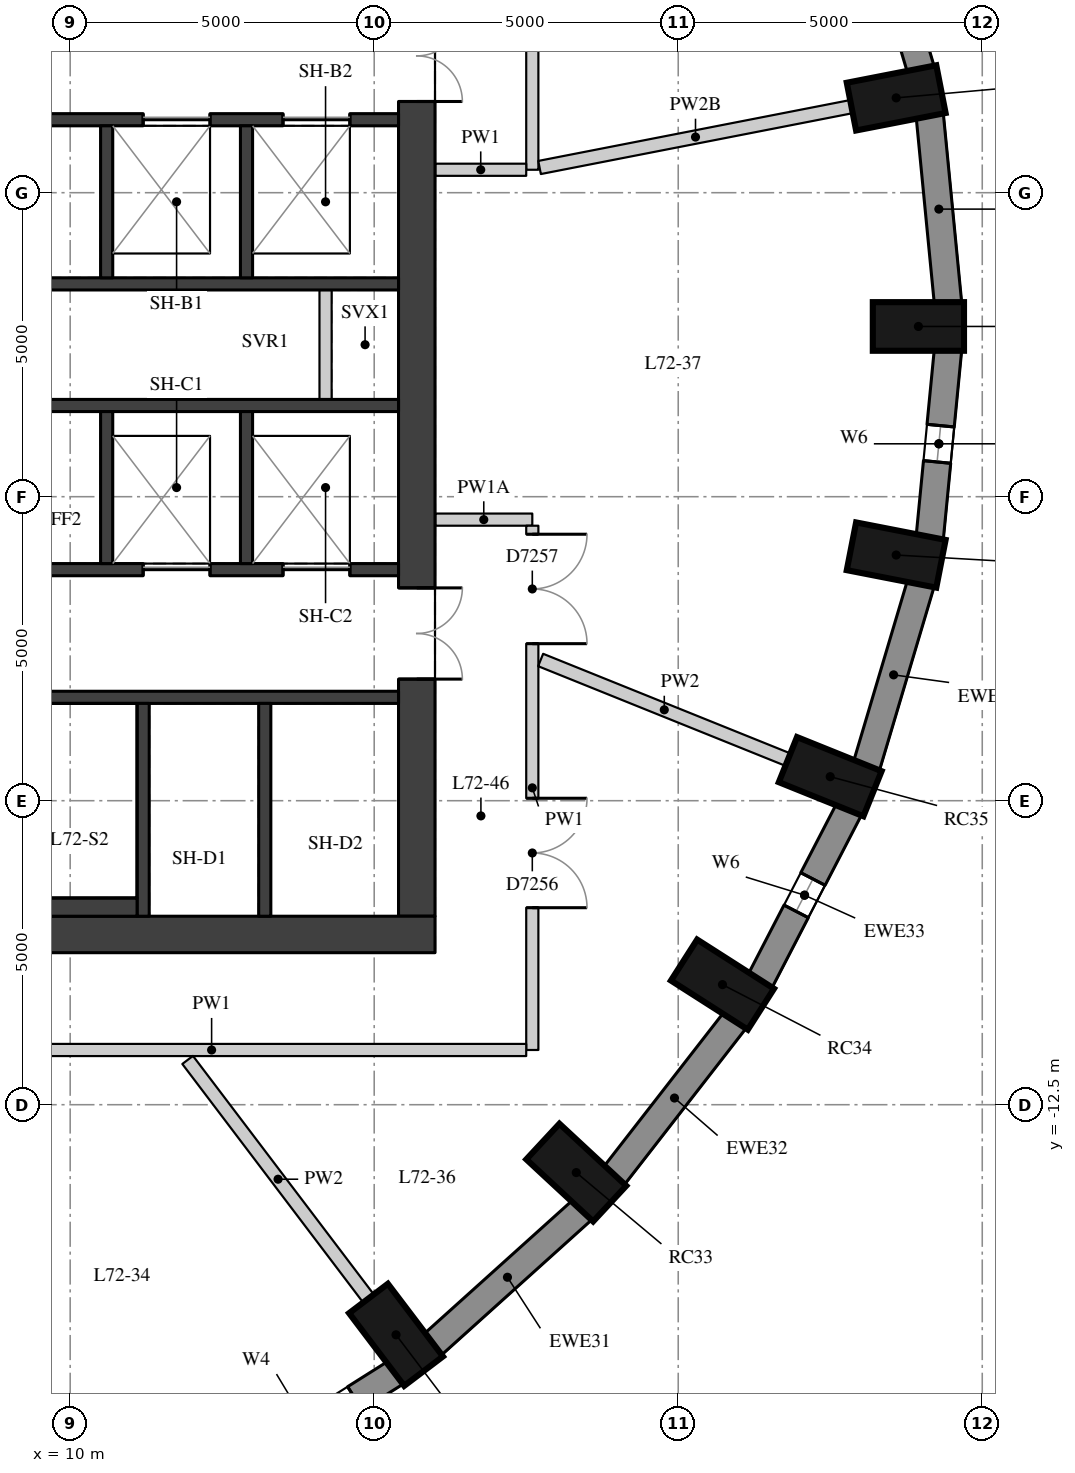
"""IFC4 building model, lengths in metres.
Left out: names, types, materials, properties, quantities, classifications, styles, units other than length and angle.
Written with IfcOpenShell. Run it as: python <this file> out.ifc"""

import sys

from ifc_helpers import new_model, si_unit, direction, frame, frame_2d, origin, origin_2d, place, context, subcontext, project, spatial, rectangle, extrude, element, fill, save


model = new_model("IFC4")
c1 = context("Model", 3, precision=1e-05, world=origin(), true_north=direction((0.0, 1.0)))
c2 = subcontext(c1, "Body", "Model", "MODEL_VIEW")
j1 = project(units=[si_unit("LENGTHUNIT", "METRE"), si_unit("PLANEANGLEUNIT", "RADIAN")], contexts=[c1])
p1 = place(None, origin())
s1 = spatial("IfcSite", under=j1, at=p1, CompositionType="ELEMENT")
p2 = place(p1, origin())
s2 = spatial("IfcBuilding", under=s1, at=p2, CompositionType="ELEMENT")
p3 = place(p2, frame((0.0, 0.0, 253.1)))
s3 = spatial("IfcBuildingStorey", under=s2, at=p3, CompositionType="ELEMENT", Elevation=253.1)
for number, where, z_axis, x_axis in (
    (1, (23.95, 0.3, 0.0), (0.0, 0.0, 1.0), (1.0, 0.0, 0.0)),
    (2, (23.585, 4.06, 0.0), (0.0, 0.0, 1.0), (0.981, 0.192, 0.0)),
    (3, (15.359, -16.285, 0.0), (0.0, 0.0, 1.0), (0.604, -0.797, 0.0)),
    (4, (18.323, -13.616, 0.0), (0.0, 0.0, 1.0), (0.733, -0.681, 0.0)),
    (5, (20.728, -10.525, 0.0), (0.0, 0.0, 1.0), (0.843, -0.539, 0.0)),
    (6, (22.5, -7.105, 0.0), (0.0, 0.0, 1.0), (0.928, -0.374, 0.0)),
    (7, (23.585, -3.459, 0.0), (0.0, 0.0, 1.0), (0.981, -0.192, 0.0)),
):
    element("IfcColumn", number, at=place(p3, frame(where, z_axis=z_axis, x_axis=x_axis)), inside=s3, PredefinedType="COLUMN", context=c2, shape_type="SweptSolid", body=[
        extrude(rectangle(XDim=1.5, YDim=0.8, at=origin_2d()), origin(), (0.0, 0.0, 1.0), 3.3),
    ])
p4 = place(p3, frame((24.437, 0.68, 0.0), z_axis=(0.0, 0.0, 1.0), x_axis=(-0.096740086873, 0.995309678237, 0.0)))
e8 = element("IfcWall", 8, at=p4, inside=s3, PredefinedType="SOLIDWALL", context=c2, shape_type="SweptSolid", body=[
    extrude(rectangle(XDim=3.114, YDim=0.45, at=frame_2d((1.557, 0.0))), origin(), (0.0, 0.0, 1.0), 3.02),
])
p5 = place(p3, frame((23.99, 4.526, 0.0), z_axis=(0.0, 0.0, 1.0), x_axis=(-0.285263800865, 0.958449040855, 0.0)))
e9 = element("IfcWall", 9, at=p5, inside=s3, PredefinedType="SOLIDWALL", context=c2, shape_type="SweptSolid", body=[
    extrude(rectangle(XDim=3.139, YDim=0.45, at=frame_2d((1.57, 0.0))), origin(), (0.0, 0.0, 1.0), 3.02),
])
p6 = place(p5, frame((1.27, 0.0, 0.4)))
e10 = element("IfcOpeningElement", 10, at=p6, cuts=e9, PredefinedType="OPENING", context=c2, shape_type="SweptSolid", body=[
    extrude(rectangle(XDim=0.6, YDim=1.75, at=frame_2d((0.3, 0.875))), frame((0.0, 0.235, 0.0), z_axis=(0.0, -1.0, 0.0), x_axis=(1.0, 0.0, 0.0)), (0.0, 0.0, 1.0), 0.47),
])
p7 = place(p3, frame((12.49, -18.711, 0.0), z_axis=(0.0, 0.0, 1.0), x_axis=(0.845929139811, 0.53329531258, 0.0)))
e11 = element("IfcWall", 11, at=p7, inside=s3, PredefinedType="SOLIDWALL", context=c2, shape_type="SweptSolid", body=[
    extrude(rectangle(XDim=3.385, YDim=0.45, at=frame_2d((1.692, 0.0))), origin(), (0.0, 0.0, 1.0), 3.02),
])
p8 = place(p7, frame((0.792, 0.0, 0.4)))
e12 = element("IfcOpeningElement", 12, at=p8, cuts=e11, PredefinedType="OPENING", context=c2, shape_type="SweptSolid", body=[
    extrude(rectangle(XDim=1.8, YDim=1.75, at=frame_2d((0.9, 0.875))), frame((0.0, 0.235, 0.0), z_axis=(0.0, -1.0, 0.0), x_axis=(1.0, 0.0, 0.0)), (0.0, 0.0, 1.0), 0.47),
])
p9 = place(p3, frame((15.959, -16.448, 0.0), z_axis=(0.0, 0.0, 1.0), x_axis=(0.743166014219, 0.669107073128, 0.0)))
e13 = element("IfcWall", 13, at=p9, inside=s3, PredefinedType="SOLIDWALL", context=c2, shape_type="SweptSolid", body=[
    extrude(rectangle(XDim=3.316, YDim=0.45, at=frame_2d((1.658, 0.0))), origin(), (0.0, 0.0, 1.0), 3.02),
])
p10 = place(p3, frame((18.942, -13.672, 0.0), z_axis=(0.0, 0.0, 1.0), x_axis=(0.613898970825, 0.789384604372, 0.0)))
e14 = element("IfcWall", 14, at=p10, inside=s3, PredefinedType="SOLIDWALL", context=c2, shape_type="SweptSolid", body=[
    extrude(rectangle(XDim=3.247, YDim=0.45, at=frame_2d((1.624, 0.0))), origin(), (0.0, 0.0, 1.0), 3.02),
])
p11 = place(p3, frame((21.345, -10.468, 0.0), z_axis=(0.0, 0.0, 1.0), x_axis=(0.459921155255, 0.887959757505, 0.0)))
e15 = element("IfcWall", 15, at=p11, inside=s3, PredefinedType="SOLIDWALL", context=c2, shape_type="SweptSolid", body=[
    extrude(rectangle(XDim=3.186, YDim=0.45, at=frame_2d((1.593, 0.0))), origin(), (0.0, 0.0, 1.0), 3.02),
])
p12 = place(p11, frame((1.293, 0.0, 0.4)))
e16 = element("IfcOpeningElement", 16, at=p12, cuts=e15, PredefinedType="OPENING", context=c2, shape_type="SweptSolid", body=[
    extrude(rectangle(XDim=0.6, YDim=1.75, at=frame_2d((0.3, 0.875))), frame((0.0, 0.235, 0.0), z_axis=(0.0, -1.0, 0.0), x_axis=(1.0, 0.0, 0.0)), (0.0, 0.0, 1.0), 0.47),
])
p13 = place(p3, frame((23.094, -6.935, 0.0), z_axis=(0.0, 0.0, 1.0), x_axis=(0.285263800865, 0.958449040855, 0.0)))
e17 = element("IfcWall", 17, at=p13, inside=s3, PredefinedType="SOLIDWALL", context=c2, shape_type="SweptSolid", body=[
    extrude(rectangle(XDim=3.139, YDim=0.45, at=frame_2d((1.57, 0.0))), origin(), (0.0, 0.0, 1.0), 3.02),
])
p14 = place(p3, frame((24.136, -3.18, 0.0), z_axis=(0.0, 0.0, 1.0), x_axis=(0.09673253904, 0.995310411827, 0.0)))
e18 = element("IfcWall", 18, at=p14, inside=s3, PredefinedType="SOLIDWALL", context=c2, shape_type="SweptSolid", body=[
    extrude(rectangle(XDim=3.115, YDim=0.45, at=frame_2d((1.557, 0.0))), origin(), (0.0, 0.0, 1.0), 3.02),
])
p15 = place(p14, frame((1.257, 0.0, 0.4)))
e19 = element("IfcOpeningElement", 19, at=p15, cuts=e18, PredefinedType="OPENING", context=c2, shape_type="SweptSolid", body=[
    extrude(rectangle(XDim=0.6, YDim=1.75, at=frame_2d((0.3, 0.875))), frame((0.0, 0.235, 0.0), z_axis=(0.0, -1.0, 0.0), x_axis=(1.0, 0.0, 0.0)), (0.0, 0.0, 1.0), 0.47),
])
p16 = place(p3, frame((15.7, -9.4, 0.0), z_axis=(0.0, 0.0, 1.0), x_axis=(0.0, 1.0, 0.0)))
e20 = element("IfcWall", 20, at=p16, inside=s3, PredefinedType="SHEAR", context=c2, shape_type="SweptSolid", body=[
    extrude(rectangle(XDim=18.8, YDim=0.6, at=frame_2d((9.4, 0.0))), origin(), (0.0, 0.0, 1.0), 3.02),
])
p17 = place(p16, frame((13.4, 0.0, 0.0)))
e21 = element("IfcOpeningElement", 21, at=p17, cuts=e20, PredefinedType="OPENING", context=c2, shape_type="SweptSolid", body=[
    extrude(rectangle(XDim=1.5, YDim=2.1, at=frame_2d((0.75, 1.05))), frame((0.0, 0.31, 0.0), z_axis=(0.0, -1.0, 0.0), x_axis=(1.0, 0.0, 0.0)), (0.0, 0.0, 1.0), 0.62),
])
p18 = place(p16, frame((3.9, 0.0, 0.0)))
e22 = element("IfcOpeningElement", 22, at=p18, cuts=e20, PredefinedType="OPENING", context=c2, shape_type="SweptSolid", body=[
    extrude(rectangle(XDim=1.5, YDim=2.1, at=frame_2d((0.75, 1.05))), frame((0.0, 0.31, 0.0), z_axis=(0.0, -1.0, 0.0), x_axis=(1.0, 0.0, 0.0)), (0.0, 0.0, 1.0), 0.62),
])
p19 = place(p3, frame((4.0, -9.7, 0.0), z_axis=(0.0, 0.0, 1.0), x_axis=(1.0, 0.0, 0.0)))
e23 = element("IfcWall", 23, at=p19, inside=s3, PredefinedType="SHEAR", context=c2, shape_type="SweptSolid", body=[
    extrude(rectangle(XDim=12.0, YDim=0.6, at=frame_2d((6.0, 0.0))), origin(), (0.0, 0.0, 1.0), 3.02),
])
p20 = place(p3, frame((4.6, 3.7, 0.0), z_axis=(0.0, 0.0, 1.0), x_axis=(1.0, 0.0, 0.0)))
e24 = element("IfcWall", 24, at=p20, inside=s3, PredefinedType="SHEAR", context=c2, shape_type="SweptSolid", body=[
    extrude(rectangle(XDim=10.8, YDim=0.2, at=frame_2d((5.4, 0.0))), origin(), (0.0, 0.0, 1.0), 3.02),
])
p21 = place(p20, frame((6.6, 0.0, 0.0)))
e25 = element("IfcOpeningElement", 25, at=p21, cuts=e24, PredefinedType="OPENING", context=c2, shape_type="SweptSolid", body=[
    extrude(rectangle(XDim=1.1, YDim=2.1, at=frame_2d((0.55, 1.05))), frame((0.0, 0.11, 0.0), z_axis=(0.0, -1.0, 0.0), x_axis=(1.0, 0.0, 0.0)), (0.0, 0.0, 1.0), 0.22),
])
p22 = place(p20, frame((8.9, 0.0, 0.0)))
e26 = element("IfcOpeningElement", 26, at=p22, cuts=e24, PredefinedType="OPENING", context=c2, shape_type="SweptSolid", body=[
    extrude(rectangle(XDim=1.1, YDim=2.1, at=frame_2d((0.55, 1.05))), frame((0.0, 0.11, 0.0), z_axis=(0.0, -1.0, 0.0), x_axis=(1.0, 0.0, 0.0)), (0.0, 0.0, 1.0), 0.22),
])
for number, where, z_axis, x_axis in (
    (27, (4.6, 1.0, 0.0), (0.0, 0.0, 1.0), (1.0, 0.0, 0.0)),
    (28, (4.6, -1.0, 0.0), (0.0, 0.0, 1.0), (1.0, 0.0, 0.0)),
):
    element("IfcWall", number, at=place(p3, frame(where, z_axis=z_axis, x_axis=x_axis)), inside=s3, PredefinedType="SHEAR", context=c2, shape_type="SweptSolid", body=[
        extrude(rectangle(XDim=10.8, YDim=0.2, at=frame_2d((5.4, 0.0))), origin(), (0.0, 0.0, 1.0), 3.02),
    ])
p23 = place(p3, frame((4.6, -3.7, 0.0), z_axis=(0.0, 0.0, 1.0), x_axis=(1.0, 0.0, 0.0)))
e29 = element("IfcWall", 29, at=p23, inside=s3, PredefinedType="SHEAR", context=c2, shape_type="SweptSolid", body=[
    extrude(rectangle(XDim=10.8, YDim=0.2, at=frame_2d((5.4, 0.0))), origin(), (0.0, 0.0, 1.0), 3.02),
])
p24 = place(p23, frame((6.6, 0.0, 0.0)))
e30 = element("IfcOpeningElement", 30, at=p24, cuts=e29, PredefinedType="OPENING", context=c2, shape_type="SweptSolid", body=[
    extrude(rectangle(XDim=1.1, YDim=2.1, at=frame_2d((0.55, 1.05))), frame((0.0, 0.11, 0.0), z_axis=(0.0, -1.0, 0.0), x_axis=(1.0, 0.0, 0.0)), (0.0, 0.0, 1.0), 0.22),
])
p25 = place(p23, frame((8.9, 0.0, 0.0)))
e31 = element("IfcOpeningElement", 31, at=p25, cuts=e29, PredefinedType="OPENING", context=c2, shape_type="SweptSolid", body=[
    extrude(rectangle(XDim=1.1, YDim=2.1, at=frame_2d((0.55, 1.05))), frame((0.0, 0.11, 0.0), z_axis=(0.0, -1.0, 0.0), x_axis=(1.0, 0.0, 0.0)), (0.0, 0.0, 1.0), 0.22),
])
p26 = place(p3, frame((4.6, -5.8, 0.0), z_axis=(0.0, 0.0, 1.0), x_axis=(1.0, 0.0, 0.0)))
e32 = element("IfcWall", 32, at=p26, inside=s3, PredefinedType="SHEAR", context=c2, shape_type="SweptSolid", body=[
    extrude(rectangle(XDim=10.8, YDim=0.2, at=frame_2d((5.4, 0.0))), origin(), (0.0, 0.0, 1.0), 3.02),
])
for number, where, z_axis, x_axis in (
    (33, (11.2, -9.4, 0.0), (0.0, 0.0, 1.0), (0.0, 1.0, 0.0)),
    (34, (13.2, -9.4, 0.0), (0.0, 0.0, 1.0), (0.0, 1.0, 0.0)),
):
    element("IfcWall", number, at=place(p3, frame(where, z_axis=z_axis, x_axis=x_axis)), inside=s3, PredefinedType="SHEAR", context=c2, shape_type="SweptSolid", body=[
        extrude(rectangle(XDim=3.5, YDim=0.2, at=frame_2d((1.75, 0.0))), origin(), (0.0, 0.0, 1.0), 3.02),
    ])
for number, where, z_axis, x_axis in (
    (35, (10.6, 1.1, 0.0), (0.0, 0.0, 1.0), (0.0, 1.0, 0.0)),
    (36, (10.6, -3.6, 0.0), (0.0, 0.0, 1.0), (0.0, 1.0, 0.0)),
    (37, (12.9, 1.1, 0.0), (0.0, 0.0, 1.0), (0.0, 1.0, 0.0)),
    (38, (12.9, -3.6, 0.0), (0.0, 0.0, 1.0), (0.0, 1.0, 0.0)),
):
    element("IfcWall", number, at=place(p3, frame(where, z_axis=z_axis, x_axis=x_axis)), inside=s3, PredefinedType="SHEAR", context=c2, shape_type="SweptSolid", body=[
        extrude(rectangle(XDim=2.5, YDim=0.2, at=frame_2d((1.25, 0.0))), origin(), (0.0, 0.0, 1.0), 3.02),
    ])
p27 = place(p3, frame((14.2, -0.9, 0.0), z_axis=(0.0, 0.0, 1.0), x_axis=(0.0, 1.0, 0.0)))
e39 = element("IfcWall", 39, at=p27, inside=s3, PredefinedType="PARTITIONING", context=c2, shape_type="SweptSolid", body=[
    extrude(rectangle(XDim=1.8, YDim=0.2, at=frame_2d((0.9, 0.0))), origin(), (0.0, 0.0, 1.0), 3.02),
])
p28 = place(p3, frame((6.22, -9.25, 0.0), z_axis=(0.0, 0.0, 1.0), x_axis=(1.0, 0.0, 0.0)))
e40 = element("IfcWall", 40, at=p28, inside=s3, PredefinedType="PARTITIONING", context=c2, shape_type="SweptSolid", body=[
    extrude(rectangle(XDim=4.88, YDim=0.3, at=frame_2d((2.44, 0.0))), origin(), (0.0, 0.0, 1.0), 3.02),
])
p29 = place(p3, frame((17.6, 11.5, 0.0), z_axis=(0.0, 0.0, 1.0), x_axis=(0.0, -1.0, 0.0)))
e41 = element("IfcWall", 41, at=p29, inside=s3, PredefinedType="PARTITIONING", context=c2, shape_type="SweptSolid", body=[
    extrude(rectangle(XDim=8.623, YDim=0.2, at=frame_2d((4.312, 0.0))), origin(), (0.0, 0.0, 1.0), 3.02),
])
p30 = place(p3, frame((17.5, 2.877, 0.0), z_axis=(0.0, 0.0, 1.0), x_axis=(-1.0, 0.0, 0.0)))
e42 = element("IfcWall", 42, at=p30, inside=s3, PredefinedType="PARTITIONING", context=c2, shape_type="SweptSolid", body=[
    extrude(rectangle(XDim=1.496, YDim=0.2, at=frame_2d((0.748, 0.0))), origin(), (0.0, 0.0, 1.0), 3.02),
])
p31 = place(p3, frame((16.004, -2.877, 0.0), z_axis=(0.0, 0.0, 1.0), x_axis=(1.0, 0.0, 0.0)))
e43 = element("IfcWall", 43, at=p31, inside=s3, PredefinedType="PARTITIONING", context=c2, shape_type="SweptSolid", body=[
    extrude(rectangle(XDim=1.596, YDim=0.2, at=frame_2d((0.798, 0.0))), origin(), (0.0, 0.0, 1.0), 2.57),
])
p32 = place(p3, frame((17.6, -2.977, 0.0), z_axis=(0.0, 0.0, 1.0), x_axis=(0.0, -1.0, 0.0)))
e44 = element("IfcWall", 44, at=p32, inside=s3, PredefinedType="PARTITIONING", context=c2, shape_type="SweptSolid", body=[
    extrude(rectangle(XDim=8.623, YDim=0.2, at=frame_2d((4.312, 0.0))), origin(), (0.0, 0.0, 1.0), 3.02),
])
p33 = place(p32, frame((4.483, 0.0, 0.0)))
e45 = element("IfcOpeningElement", 45, at=p33, cuts=e44, PredefinedType="OPENING", context=c2, shape_type="SweptSolid", body=[
    extrude(rectangle(XDim=1.8, YDim=2.1, at=frame_2d((0.9, 1.05))), frame((0.0, 0.11, 0.0), z_axis=(0.0, -1.0, 0.0), x_axis=(1.0, 0.0, 0.0)), (0.0, 0.0, 1.0), 0.22),
])
p34 = place(p32, frame((0.14, 0.0, 0.0)))
e46 = element("IfcOpeningElement", 46, at=p34, cuts=e44, PredefinedType="OPENING", context=c2, shape_type="SweptSolid", body=[
    extrude(rectangle(XDim=1.8, YDim=2.1, at=frame_2d((0.9, 1.05))), frame((0.0, 0.11, 0.0), z_axis=(0.0, -1.0, 0.0), x_axis=(1.0, 0.0, 0.0)), (0.0, 0.0, 1.0), 0.22),
])
p35 = place(p3, frame((17.5, -11.6, 0.0), z_axis=(0.0, 0.0, 1.0), x_axis=(-1.0, 0.0, 0.0)))
e47 = element("IfcWall", 47, at=p35, inside=s3, PredefinedType="PARTITIONING", context=c2, shape_type="SweptSolid", body=[
    extrude(rectangle(XDim=10.348, YDim=0.2, at=frame_2d((5.174, 0.0))), origin(), (0.0, 0.0, 1.0), 3.02),
])
p36 = place(p35, frame((8.462, 0.0, 0.0)))
e48 = element("IfcOpeningElement", 48, at=p36, cuts=e47, PredefinedType="OPENING", context=c2, shape_type="SweptSolid", body=[
    extrude(rectangle(XDim=1.1, YDim=2.1, at=frame_2d((0.55, 1.05))), frame((0.0, 0.11, 0.0), z_axis=(0.0, -1.0, 0.0), x_axis=(1.0, 0.0, 0.0)), (0.0, 0.0, 1.0), 0.22),
])
p37 = place(p3, frame((22.849, 3.916, 0.0), z_axis=(0.0, 0.0, 1.0), x_axis=(-0.981474096155, -0.191594881394, 0.0)))
e49 = element("IfcWall", 49, at=p37, inside=s3, PredefinedType="PARTITIONING", context=c2, shape_type="SweptSolid", body=[
    extrude(rectangle(XDim=5.226, YDim=0.22, at=frame_2d((2.613, 0.0))), origin(), (0.0, 0.0, 1.0), 2.57),
])
p38 = place(p3, frame((14.906, -15.687, 0.0), z_axis=(0.0, 0.0, 1.0), x_axis=(-0.604078206052, 0.796925041, 0.0)))
e50 = element("IfcWall", 50, at=p38, inside=s3, PredefinedType="PARTITIONING", context=c2, shape_type="SweptSolid", body=[
    extrude(rectangle(XDim=4.923, YDim=0.22, at=frame_2d((2.462, 0.0))), origin(), (0.0, 0.0, 1.0), 3.02),
])
p39 = place(p3, frame((21.804, -6.824, 0.0), z_axis=(0.0, 0.0, 1.0), x_axis=(-0.927528978592, 0.373751245981, 0.0)))
e51 = element("IfcWall", 51, at=p39, inside=s3, PredefinedType="PARTITIONING", context=c2, shape_type="SweptSolid", body=[
    extrude(rectangle(XDim=4.384, YDim=0.22, at=frame_2d((2.192, 0.0))), origin(), (0.0, 0.0, 1.0), 3.02),
])
p40 = place(p12, origin())
e52 = element("IfcWindow", 52, at=p40, inside=s3, PartitioningType="SINGLE_PANEL", PredefinedType="WINDOW", context=c2, shape_type="SweptSolid", body=[
    extrude(rectangle(XDim=0.6, YDim=1.75, at=frame_2d((0.3, 0.875))), frame((0.0, 0.035, 0.0), z_axis=(0.0, -1.0, 0.0), x_axis=(1.0, 0.0, 0.0)), (0.0, 0.0, 1.0), 0.06),
])
fill(e16, e52)
p41 = place(p15, origin())
e53 = element("IfcWindow", 53, at=p41, inside=s3, PartitioningType="SINGLE_PANEL", PredefinedType="WINDOW", context=c2, shape_type="SweptSolid", body=[
    extrude(rectangle(XDim=0.6, YDim=1.75, at=frame_2d((0.3, 0.875))), frame((0.0, 0.035, 0.0), z_axis=(0.0, -1.0, 0.0), x_axis=(1.0, 0.0, 0.0)), (0.0, 0.0, 1.0), 0.06),
])
fill(e19, e53)
p42 = place(p17, origin())
e54 = element("IfcDoor", 54, at=p42, inside=s3, OperationType="DOUBLE_DOOR_SINGLE_SWING", PredefinedType="DOOR", context=c2, shape_type="SweptSolid", body=[
    extrude(rectangle(XDim=1.5, YDim=2.1, at=frame_2d((0.75, 1.05))), frame((0.0, 0.025, 0.0), z_axis=(0.0, -1.0, 0.0), x_axis=(1.0, 0.0, 0.0)), (0.0, 0.0, 1.0), 0.05),
])
fill(e21, e54)
p43 = place(p18, origin())
e55 = element("IfcDoor", 55, at=p43, inside=s3, OperationType="DOUBLE_DOOR_SINGLE_SWING", PredefinedType="DOOR", context=c2, shape_type="SweptSolid", body=[
    extrude(rectangle(XDim=1.5, YDim=2.1, at=frame_2d((0.75, 1.05))), frame((0.0, 0.025, 0.0), z_axis=(0.0, -1.0, 0.0), x_axis=(1.0, 0.0, 0.0)), (0.0, 0.0, 1.0), 0.05),
])
fill(e22, e55)
p44 = place(p21, origin())
e56 = element("IfcDoor", 56, at=p44, inside=s3, OperationType="DOUBLE_DOOR_SLIDING", PredefinedType="DOOR", context=c2, shape_type="SweptSolid", body=[
    extrude(rectangle(XDim=1.1, YDim=2.1, at=frame_2d((0.55, 1.05))), frame((0.0, 0.025, 0.0), z_axis=(0.0, -1.0, 0.0), x_axis=(1.0, 0.0, 0.0)), (0.0, 0.0, 1.0), 0.05),
])
fill(e25, e56)
p45 = place(p22, origin())
e57 = element("IfcDoor", 57, at=p45, inside=s3, OperationType="DOUBLE_DOOR_SLIDING", PredefinedType="DOOR", context=c2, shape_type="SweptSolid", body=[
    extrude(rectangle(XDim=1.1, YDim=2.1, at=frame_2d((0.55, 1.05))), frame((0.0, 0.025, 0.0), z_axis=(0.0, -1.0, 0.0), x_axis=(1.0, 0.0, 0.0)), (0.0, 0.0, 1.0), 0.05),
])
fill(e26, e57)
p46 = place(p24, origin())
e58 = element("IfcDoor", 58, at=p46, inside=s3, OperationType="DOUBLE_DOOR_SLIDING", PredefinedType="DOOR", context=c2, shape_type="SweptSolid", body=[
    extrude(rectangle(XDim=1.1, YDim=2.1, at=frame_2d((0.55, 1.05))), frame((0.0, 0.025, 0.0), z_axis=(0.0, -1.0, 0.0), x_axis=(1.0, 0.0, 0.0)), (0.0, 0.0, 1.0), 0.05),
])
fill(e30, e58)
p47 = place(p25, origin())
e59 = element("IfcDoor", 59, at=p47, inside=s3, OperationType="DOUBLE_DOOR_SLIDING", PredefinedType="DOOR", context=c2, shape_type="SweptSolid", body=[
    extrude(rectangle(XDim=1.1, YDim=2.1, at=frame_2d((0.55, 1.05))), frame((0.0, 0.025, 0.0), z_axis=(0.0, -1.0, 0.0), x_axis=(1.0, 0.0, 0.0)), (0.0, 0.0, 1.0), 0.05),
])
fill(e31, e59)
p48 = place(p33, origin())
e60 = element("IfcDoor", 60, at=p48, inside=s3, OperationType="DOUBLE_DOOR_SINGLE_SWING", PredefinedType="DOOR", context=c2, shape_type="SweptSolid", body=[
    extrude(rectangle(XDim=1.8, YDim=2.1, at=frame_2d((0.9, 1.05))), frame((0.0, 0.025, 0.0), z_axis=(0.0, -1.0, 0.0), x_axis=(1.0, 0.0, 0.0)), (0.0, 0.0, 1.0), 0.05),
])
fill(e45, e60)
p49 = place(p34, origin())
e61 = element("IfcDoor", 61, at=p49, inside=s3, OperationType="DOUBLE_DOOR_SINGLE_SWING", PredefinedType="DOOR", context=c2, shape_type="SweptSolid", body=[
    extrude(rectangle(XDim=1.8, YDim=2.1, at=frame_2d((0.9, 1.05))), frame((0.0, 0.025, 0.0), z_axis=(0.0, -1.0, 0.0), x_axis=(1.0, 0.0, 0.0)), (0.0, 0.0, 1.0), 0.05),
])
fill(e46, e61)
save(model, sys.argv[1])
